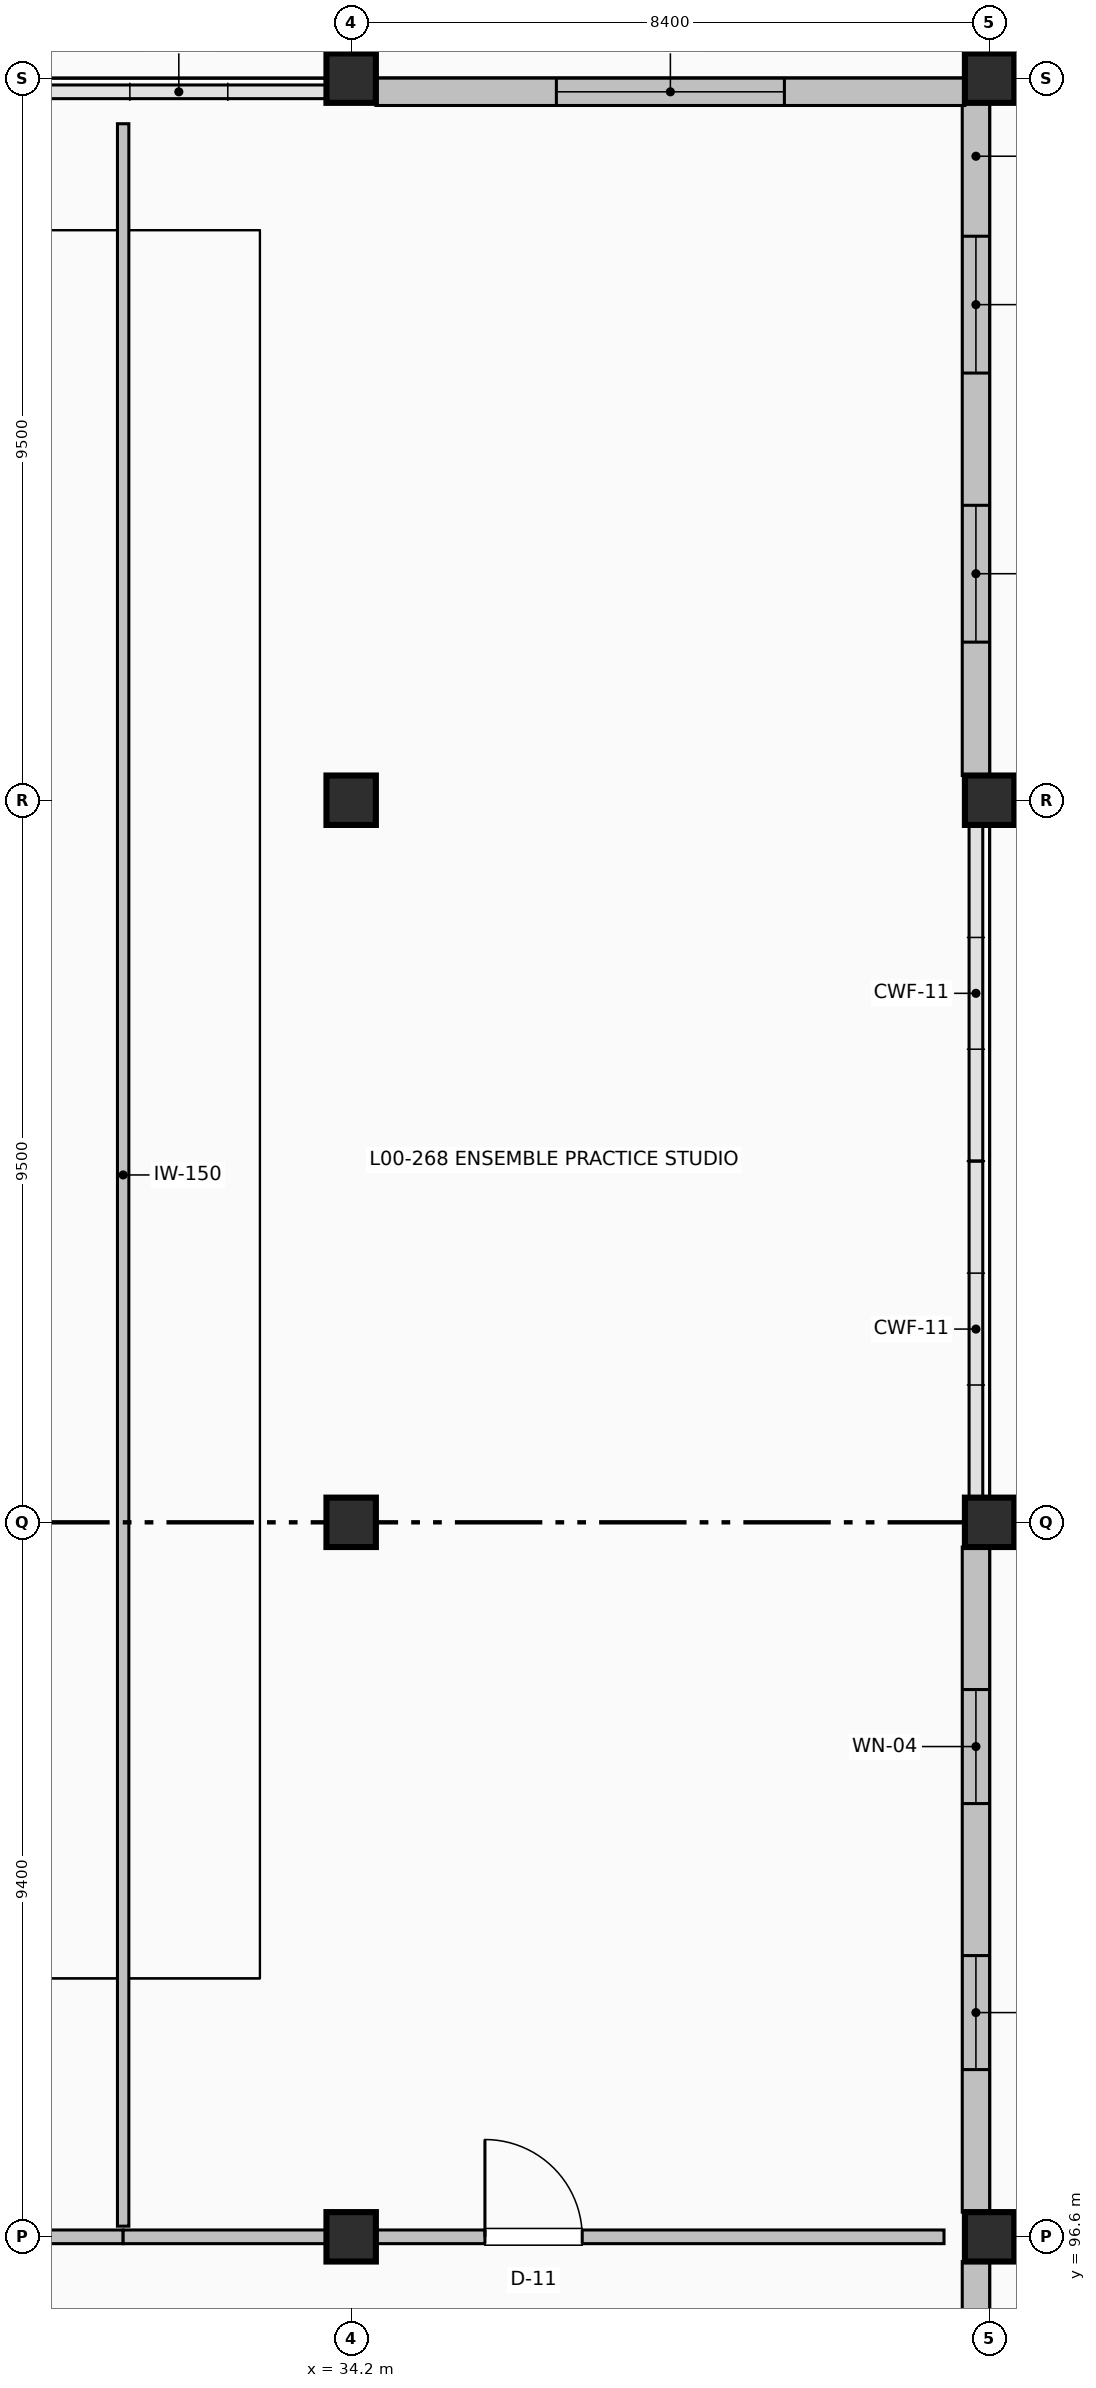
"""IFC4 building model, lengths in metres.
Left out: names, types, materials, properties, quantities, classifications, styles, units other than length and angle.
Written with IfcOpenShell. Run it as: python <this file> out.ifc"""

import sys

from ifc_helpers import new_model, si_unit, direction, frame, frame_2d, origin, origin_2d, place, context, subcontext, project, spatial, rectangle, extrude, element, fill, save


model = new_model("IFC4")
c1 = context("Model", 3, precision=1e-05, world=origin(), true_north=direction((0.0, 1.0)))
c2 = subcontext(c1, "Body", "Model", "MODEL_VIEW")
j1 = project(units=[si_unit("LENGTHUNIT", "METRE"), si_unit("PLANEANGLEUNIT", "RADIAN")], contexts=[c1])
p1 = place(None, origin())
s1 = spatial("IfcSite", under=j1, at=p1, CompositionType="ELEMENT")
p2 = place(p1, origin())
s2 = spatial("IfcBuilding", under=s1, at=p2, CompositionType="ELEMENT")
p3 = place(p2, origin())
s3 = spatial("IfcBuildingStorey", under=s2, at=p3, CompositionType="ELEMENT", Elevation=0.0)
for number, where, z_axis, x_axis in (
    (1, (34.2, 96.6, 0.0), (0.0, 0.0, 1.0), (1.0, 0.0, 0.0)),
    (2, (34.2, 106.0, 0.0), (0.0, 0.0, 1.0), (1.0, 0.0, 0.0)),
    (3, (34.2, 115.5, 0.0), (0.0, 0.0, 1.0), (1.0, 0.0, 0.0)),
    (4, (34.2, 125.0, 0.0), (0.0, 0.0, 1.0), (1.0, 0.0, 0.0)),
    (5, (42.6, 96.6, 0.0), (0.0, 0.0, 1.0), (1.0, 0.0, 0.0)),
    (6, (42.6, 106.0, 0.0), (0.0, 0.0, 1.0), (1.0, 0.0, 0.0)),
    (7, (42.6, 115.5, 0.0), (0.0, 0.0, 1.0), (1.0, 0.0, 0.0)),
    (8, (42.6, 125.0, 0.0), (0.0, 0.0, 1.0), (1.0, 0.0, 0.0)),
):
    element("IfcColumn", number, at=place(p3, frame(where, z_axis=z_axis, x_axis=x_axis)), inside=s3, PredefinedType="COLUMN", context=c2, shape_type="SweptSolid", body=[
        extrude(rectangle(XDim=0.65, YDim=0.65, at=origin_2d()), origin(), (0.0, 0.0, 1.0), 5.4),
    ])
p4 = place(p3, frame((42.42, 124.675, 0.0), z_axis=(0.0, 0.0, 1.0), x_axis=(0.0, -1.0, 0.0)))
e9 = element("IfcWall", 9, at=p4, inside=s3, PredefinedType="SOLIDWALL", context=c2, shape_type="SweptSolid", body=[
    extrude(rectangle(XDim=8.85, YDim=0.36, at=frame_2d((4.425, 0.0))), origin(), (0.0, 0.0, 1.0), 4.192),
])
p5 = place(p4, frame((1.755, 0.0, 0.9)))
e10 = element("IfcOpeningElement", 10, at=p5, cuts=e9, PredefinedType="OPENING", context=c2, shape_type="SweptSolid", body=[
    extrude(rectangle(XDim=1.8, YDim=2.1, at=frame_2d((0.9, 1.05))), frame((0.0, 0.19, 0.0), z_axis=(0.0, -1.0, 0.0), x_axis=(1.0, 0.0, 0.0)), (0.0, 0.0, 1.0), 0.38),
])
p6 = place(p4, frame((5.295, 0.0, 0.9)))
e11 = element("IfcOpeningElement", 11, at=p6, cuts=e9, PredefinedType="OPENING", context=c2, shape_type="SweptSolid", body=[
    extrude(rectangle(XDim=1.8, YDim=2.1, at=frame_2d((0.9, 1.05))), frame((0.0, 0.19, 0.0), z_axis=(0.0, -1.0, 0.0), x_axis=(1.0, 0.0, 0.0)), (0.0, 0.0, 1.0), 0.38),
])
p7 = place(p3, frame((42.42, 105.675, 0.0), z_axis=(0.0, 0.0, 1.0), x_axis=(0.0, -1.0, 0.0)))
e12 = element("IfcWall", 12, at=p7, inside=s3, PredefinedType="SOLIDWALL", context=c2, shape_type="SweptSolid", body=[
    extrude(rectangle(XDim=8.75, YDim=0.36, at=frame_2d((4.375, 0.0))), origin(), (0.0, 0.0, 1.0), 4.192),
])
p8 = place(p7, frame((1.875, 0.0, 0.9)))
e13 = element("IfcOpeningElement", 13, at=p8, cuts=e12, PredefinedType="OPENING", context=c2, shape_type="SweptSolid", body=[
    extrude(rectangle(XDim=1.5, YDim=2.1, at=frame_2d((0.75, 1.05))), frame((0.0, 0.19, 0.0), z_axis=(0.0, -1.0, 0.0), x_axis=(1.0, 0.0, 0.0)), (0.0, 0.0, 1.0), 0.38),
])
p9 = place(p7, frame((5.375, 0.0, 0.9)))
e14 = element("IfcOpeningElement", 14, at=p9, cuts=e12, PredefinedType="OPENING", context=c2, shape_type="SweptSolid", body=[
    extrude(rectangle(XDim=1.5, YDim=2.1, at=frame_2d((0.75, 1.05))), frame((0.0, 0.19, 0.0), z_axis=(0.0, -1.0, 0.0), x_axis=(1.0, 0.0, 0.0)), (0.0, 0.0, 1.0), 0.38),
])
p10 = place(p3, frame((42.42, 96.275, 0.0), z_axis=(0.0, 0.0, 1.0), x_axis=(0.0, -1.0, 0.0)))
e15 = element("IfcWall", 15, at=p10, inside=s3, PredefinedType="SOLIDWALL", context=c2, shape_type="SweptSolid", body=[
    extrude(rectangle(XDim=8.665, YDim=0.36, at=frame_2d((4.333, 0.0))), origin(), (0.0, 0.0, 1.0), 4.192),
])
p11 = place(p10, frame((2.033, 0.0, 0.0)))
e16 = element("IfcOpeningElement", 16, at=p11, cuts=e15, PredefinedType="OPENING", context=c2, shape_type="SweptSolid", body=[
    extrude(rectangle(XDim=2.0, YDim=2.4, at=frame_2d((1.0, 1.2))), frame((0.0, 0.19, 0.0), z_axis=(0.0, -1.0, 0.0), x_axis=(1.0, 0.0, 0.0)), (0.0, 0.0, 1.0), 0.38),
])
p12 = place(p3, frame((34.525, 124.82, 0.0), z_axis=(0.0, 0.0, 1.0), x_axis=(1.0, 0.0, 0.0)))
e17 = element("IfcWall", 17, at=p12, inside=s3, PredefinedType="SOLIDWALL", context=c2, shape_type="SweptSolid", body=[
    extrude(rectangle(XDim=7.75, YDim=0.36, at=frame_2d((3.875, 0.0))), origin(), (0.0, 0.0, 1.0), 4.192),
])
p13 = place(p12, frame((2.375, 0.0, 0.9)))
e18 = element("IfcOpeningElement", 18, at=p13, cuts=e17, PredefinedType="OPENING", context=c2, shape_type="SweptSolid", body=[
    extrude(rectangle(XDim=3.0, YDim=2.1, at=frame_2d((1.5, 1.05))), frame((0.0, 0.19, 0.0), z_axis=(0.0, -1.0, 0.0), x_axis=(1.0, 0.0, 0.0)), (0.0, 0.0, 1.0), 0.38),
])
p14 = place(p3, frame((26.125, 96.6, 0.0), z_axis=(0.0, 0.0, 1.0), x_axis=(1.0, 0.0, 0.0)))
e19 = element("IfcWall", 19, at=p14, inside=s3, PredefinedType="PARTITIONING", context=c2, shape_type="SweptSolid", body=[
    extrude(rectangle(XDim=5.075, YDim=0.18, at=frame_2d((2.538, 0.0))), origin(), (0.0, 0.0, 1.0), 4.242),
])
p15 = place(p3, frame((31.2, 96.74, 0.0), z_axis=(0.0, 0.0, 1.0), x_axis=(0.0, 1.0, 0.0)))
e20 = element("IfcWall", 20, at=p15, inside=s3, PredefinedType="PARTITIONING", context=c2, shape_type="SweptSolid", body=[
    extrude(rectangle(XDim=27.66, YDim=0.15, at=frame_2d((13.83, 0.0))), origin(), (0.0, 0.0, 1.0), 5.092),
])
p16 = place(p3, frame((31.2, 96.6, 0.0), z_axis=(0.0, 0.0, 1.0), x_axis=(1.0, 0.0, 0.0)))
e21 = element("IfcWall", 21, at=p16, inside=s3, PredefinedType="PARTITIONING", context=c2, shape_type="SweptSolid", body=[
    extrude(rectangle(XDim=2.675, YDim=0.18, at=frame_2d((1.337, 0.0))), origin(), (0.0, 0.0, 1.0), 4.242),
])
p17 = place(p3, frame((34.525, 96.6, 0.0), z_axis=(0.0, 0.0, 1.0), x_axis=(1.0, 0.0, 0.0)))
e22 = element("IfcWall", 22, at=p17, inside=s3, PredefinedType="PARTITIONING", context=c2, shape_type="SweptSolid", body=[
    extrude(rectangle(XDim=7.475, YDim=0.18, at=frame_2d((3.738, 0.0))), origin(), (0.0, 0.0, 1.0), 4.242),
])
p18 = place(p17, frame((1.435, 0.0, 0.0)))
e23 = element("IfcOpeningElement", 23, at=p18, cuts=e22, PredefinedType="OPENING", context=c2, shape_type="SweptSolid", body=[
    extrude(rectangle(XDim=1.28, YDim=2.14, at=frame_2d((0.64, 1.07))), frame((0.0, 0.1, 0.0), z_axis=(0.0, -1.0, 0.0), x_axis=(1.0, 0.0, 0.0)), (0.0, 0.0, 1.0), 0.2),
])
p19 = place(p5, origin())
e24 = element("IfcWindow", 24, at=p19, inside=s3, PartitioningType="SINGLE_PANEL", PredefinedType="WINDOW", context=c2, shape_type="SweptSolid", body=[
    extrude(rectangle(XDim=1.8, YDim=2.1, at=frame_2d((0.9, 1.05))), frame((0.0, 0.03, 0.0), z_axis=(0.0, -1.0, 0.0), x_axis=(1.0, 0.0, 0.0)), (0.0, 0.0, 1.0), 0.06),
])
fill(e10, e24)
p20 = place(p6, origin())
e25 = element("IfcWindow", 25, at=p20, inside=s3, PartitioningType="SINGLE_PANEL", PredefinedType="WINDOW", context=c2, shape_type="SweptSolid", body=[
    extrude(rectangle(XDim=1.8, YDim=2.1, at=frame_2d((0.9, 1.05))), frame((0.0, 0.03, 0.0), z_axis=(0.0, -1.0, 0.0), x_axis=(1.0, 0.0, 0.0)), (0.0, 0.0, 1.0), 0.06),
])
fill(e11, e25)
p21 = place(p8, origin())
e26 = element("IfcWindow", 26, at=p21, inside=s3, PartitioningType="SINGLE_PANEL", PredefinedType="WINDOW", context=c2, shape_type="SweptSolid", body=[
    extrude(rectangle(XDim=1.5, YDim=2.1, at=frame_2d((0.75, 1.05))), frame((0.0, 0.03, 0.0), z_axis=(0.0, -1.0, 0.0), x_axis=(1.0, 0.0, 0.0)), (0.0, 0.0, 1.0), 0.06),
])
fill(e13, e26)
p22 = place(p9, origin())
e27 = element("IfcWindow", 27, at=p22, inside=s3, PartitioningType="SINGLE_PANEL", PredefinedType="WINDOW", context=c2, shape_type="SweptSolid", body=[
    extrude(rectangle(XDim=1.5, YDim=2.1, at=frame_2d((0.75, 1.05))), frame((0.0, 0.03, 0.0), z_axis=(0.0, -1.0, 0.0), x_axis=(1.0, 0.0, 0.0)), (0.0, 0.0, 1.0), 0.06),
])
fill(e14, e27)
p23 = place(p13, origin())
e28 = element("IfcWindow", 28, at=p23, inside=s3, PartitioningType="SINGLE_PANEL", PredefinedType="WINDOW", context=c2, shape_type="SweptSolid", body=[
    extrude(rectangle(XDim=3.0, YDim=2.1, at=frame_2d((1.5, 1.05))), frame((0.0, 0.03, 0.0), z_axis=(0.0, -1.0, 0.0), x_axis=(1.0, 0.0, 0.0)), (0.0, 0.0, 1.0), 0.06),
])
fill(e18, e28)
p24 = place(p18, origin())
e29 = element("IfcDoor", 29, at=p24, inside=s3, OperationType="SINGLE_SWING_LEFT", PredefinedType="DOOR", context=c2, shape_type="SweptSolid", body=[
    extrude(rectangle(XDim=1.28, YDim=2.14, at=frame_2d((0.64, 1.07))), frame((0.0, 0.025, 0.0), z_axis=(0.0, -1.0, 0.0), x_axis=(1.0, 0.0, 0.0)), (0.0, 0.0, 1.0), 0.05),
])
fill(e23, e29)
save(model, sys.argv[1])
